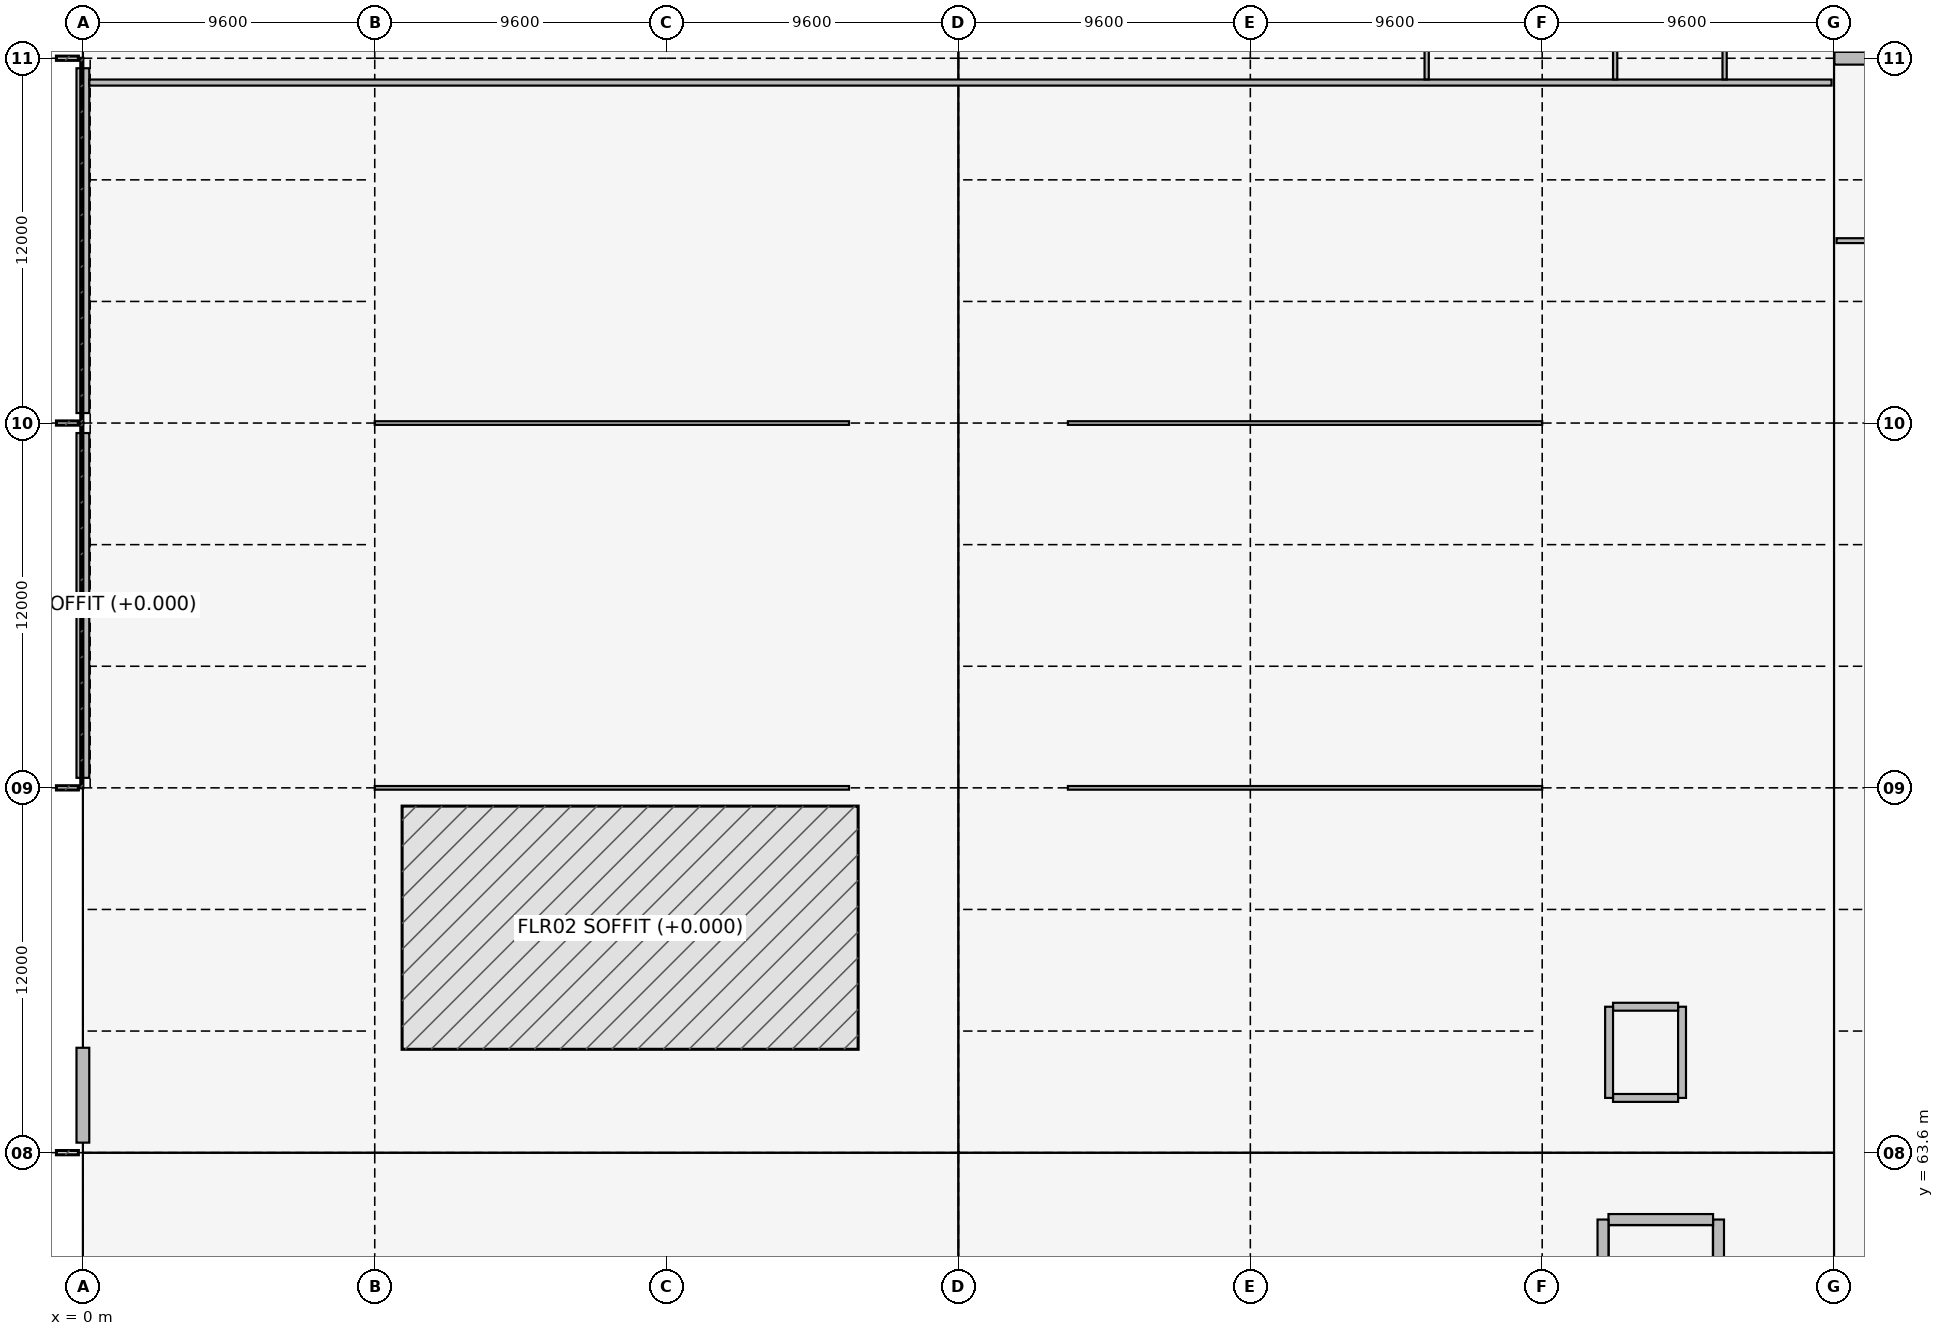
"""IFC4 building model, lengths in metres.
Left out: names, types, materials, properties, quantities, classifications, styles, units other than length and angle.
Written with IfcOpenShell. Run it as: python <this file> out.ifc"""

import sys

from ifc_helpers import new_model, si_unit, direction, frame, frame_2d, origin, origin_2d, place, context, subcontext, project, spatial, rectangle, i_section, extrude, element, fill, save


model = new_model("IFC4")
c1 = context("Model", 3, precision=1e-05, world=origin(), true_north=direction((0.0, 1.0)))
c2 = subcontext(c1, "Body", "Model", "MODEL_VIEW")
j1 = project(units=[si_unit("LENGTHUNIT", "METRE"), si_unit("PLANEANGLEUNIT", "RADIAN")], contexts=[c1])
p1 = place(None, origin())
s1 = spatial("IfcSite", under=j1, at=p1, CompositionType="ELEMENT")
p2 = place(p1, origin())
s2 = spatial("IfcBuilding", under=s1, at=p2, CompositionType="ELEMENT")
p3 = place(p2, origin())
s3 = spatial("IfcBuildingStorey", under=s2, at=p3, CompositionType="ELEMENT", Elevation=0.0)
for number, where, z_axis, x_axis in (
    (1, (0.0, 63.6, 0.0), (0.0, 0.0, 1.0), (1.0, 0.0, 0.0)),
    (2, (0.0, 75.6, 0.0), (0.0, 0.0, 1.0), (1.0, 0.0, 0.0)),
    (3, (0.0, 87.6, 0.0), (0.0, 0.0, 1.0), (1.0, 0.0, 0.0)),
    (4, (0.0, 99.6, 0.0), (0.0, 0.0, 1.0), (1.0, 0.0, 0.0)),
):
    element("IfcColumn", number, at=place(p3, frame(where, z_axis=z_axis, x_axis=x_axis)), inside=s3, PredefinedType="COLUMN", context=c2, shape_type="SweptSolid", body=[
        extrude(i_section(OverallWidth=0.3, OverallDepth=0.65, WebThickness=0.016, FlangeThickness=0.031, FilletRadius=0.027, at=origin_2d()), origin(), (0.0, 0.0, 1.0), 5.4),
    ])
for number, where, z_axis, x_axis in (
    (5, (9.6, 63.6, 0.0), (0.0, 0.0, 1.0), (1.0, 0.0, 0.0)),
    (6, (9.6, 75.6, 0.0), (0.0, 0.0, 1.0), (1.0, 0.0, 0.0)),
):
    element("IfcColumn", number, at=place(p3, frame(where, z_axis=z_axis, x_axis=x_axis)), inside=s3, PredefinedType="COLUMN", context=c2, shape_type="SweptSolid", body=[
        extrude(i_section(OverallWidth=0.3, OverallDepth=0.44, WebThickness=0.011, FlangeThickness=0.021, FilletRadius=0.027, at=origin_2d()), origin(), (0.0, 0.0, 1.0), 5.4),
    ])
for number, where, z_axis, x_axis in (
    (7, (9.6, 87.6, 0.0), (0.0, 0.0, 1.0), (1.0, 0.0, 0.0)),
    (8, (9.6, 99.6, 0.0), (0.0, 0.0, 1.0), (1.0, 0.0, 0.0)),
    (9, (19.2, 99.6, 0.0), (0.0, 0.0, 1.0), (1.0, 0.0, 0.0)),
    (10, (28.8, 99.6, 0.0), (0.0, 0.0, 1.0), (1.0, 0.0, 0.0)),
    (11, (38.4, 99.6, 0.0), (0.0, 0.0, 1.0), (1.0, 0.0, 0.0)),
):
    element("IfcColumn", number, at=place(p3, frame(where, z_axis=z_axis, x_axis=x_axis)), inside=s3, PredefinedType="COLUMN", context=c2, shape_type="SweptSolid", body=[
        extrude(i_section(OverallWidth=0.3, OverallDepth=0.54, WebThickness=0.012, FlangeThickness=0.024, FilletRadius=0.027, at=origin_2d()), origin(), (0.0, 0.0, 1.0), 5.4),
    ])
for number, where, z_axis, x_axis in (
    (12, (48.0, 63.6, 0.0), (0.0, 0.0, 1.0), (1.0, 0.0, 0.0)),
    (13, (48.0, 75.6, 0.0), (0.0, 0.0, 1.0), (1.0, 0.0, 0.0)),
):
    element("IfcColumn", number, at=place(p3, frame(where, z_axis=z_axis, x_axis=x_axis)), inside=s3, PredefinedType="COLUMN", context=c2, shape_type="SweptSolid", body=[
        extrude(i_section(OverallWidth=0.3, OverallDepth=0.44, WebThickness=0.011, FlangeThickness=0.021, FilletRadius=0.027, at=origin_2d()), origin(), (0.0, 0.0, 1.0), 5.4),
    ])
for number, where, z_axis, x_axis in (
    (14, (48.0, 87.6, 0.0), (0.0, 0.0, 1.0), (1.0, 0.0, 0.0)),
    (15, (48.0, 99.6, 0.0), (0.0, 0.0, 1.0), (1.0, 0.0, 0.0)),
):
    element("IfcColumn", number, at=place(p3, frame(where, z_axis=z_axis, x_axis=x_axis)), inside=s3, PredefinedType="COLUMN", context=c2, shape_type="SweptSolid", body=[
        extrude(i_section(OverallWidth=0.3, OverallDepth=0.54, WebThickness=0.012, FlangeThickness=0.024, FilletRadius=0.027, at=origin_2d()), origin(), (0.0, 0.0, 1.0), 5.4),
    ])
for number, where, z_axis, x_axis in (
    (16, (57.6, 63.6, 0.0), (0.0, 0.0, 1.0), (1.0, 0.0, 0.0)),
    (17, (57.6, 75.6, 0.0), (0.0, 0.0, 1.0), (1.0, 0.0, 0.0)),
    (18, (57.6, 87.6, 0.0), (0.0, 0.0, 1.0), (1.0, 0.0, 0.0)),
    (19, (57.6, 99.6, 0.0), (0.0, 0.0, 1.0), (1.0, 0.0, 0.0)),
):
    element("IfcColumn", number, at=place(p3, frame(where, z_axis=z_axis, x_axis=x_axis)), inside=s3, PredefinedType="COLUMN", context=c2, shape_type="SweptSolid", body=[
        extrude(i_section(OverallWidth=0.3, OverallDepth=0.65, WebThickness=0.016, FlangeThickness=0.031, FilletRadius=0.027, at=origin_2d()), origin(), (0.0, 0.0, 1.0), 5.4),
    ])
p4 = place(p3, frame((53.8, 53.4, 0.0), z_axis=(0.0, 0.0, 1.0), x_axis=(0.0, 1.0, 0.0)))
e20 = element("IfcWall", 20, at=p4, inside=s3, PredefinedType="SHEAR", context=c2, shape_type="SweptSolid", body=[
    extrude(rectangle(XDim=8.0, YDim=0.36, at=frame_2d((4.0, 0.0))), origin(), (0.0, 0.0, 1.0), 5.12),
])
p5 = place(p3, frame((53.62, 61.4, 0.0), z_axis=(0.0, 0.0, 1.0), x_axis=(-1.0, 0.0, 0.0)))
e21 = element("IfcWall", 21, at=p5, inside=s3, PredefinedType="SHEAR", context=c2, shape_type="SweptSolid", body=[
    extrude(rectangle(XDim=3.44, YDim=0.36, at=frame_2d((1.72, 0.0))), origin(), (0.0, 0.0, 1.0), 5.12),
])
p6 = place(p3, frame((50.0, 61.4, 0.0), z_axis=(0.0, 0.0, 1.0), x_axis=(0.0, -1.0, 0.0)))
e22 = element("IfcWall", 22, at=p6, inside=s3, PredefinedType="SHEAR", context=c2, shape_type="SweptSolid", body=[
    extrude(rectangle(XDim=8.0, YDim=0.36, at=frame_2d((4.0, 0.0))), origin(), (0.0, 0.0, 1.0), 5.12),
])
p7 = place(p3, frame((50.33, 65.4, 0.0), z_axis=(0.0, 0.0, 1.0), x_axis=(1.0, 0.0, 0.0)))
e23 = element("IfcWall", 23, at=p7, inside=s3, PredefinedType="SHEAR", context=c2, shape_type="SweptSolid", body=[
    extrude(rectangle(XDim=2.14, YDim=0.26, at=frame_2d((1.07, 0.0))), origin(), (0.0, 0.0, 1.0), 5.12),
])
p8 = place(p3, frame((52.6, 65.4, 0.0), z_axis=(0.0, 0.0, 1.0), x_axis=(0.0, 1.0, 0.0)))
e24 = element("IfcWall", 24, at=p8, inside=s3, PredefinedType="SHEAR", context=c2, shape_type="SweptSolid", body=[
    extrude(rectangle(XDim=3.0, YDim=0.26, at=frame_2d((1.5, 0.0))), origin(), (0.0, 0.0, 1.0), 5.12),
])
p9 = place(p8, frame((0.95, 0.0, 0.0)))
e25 = element("IfcOpeningElement", 25, at=p9, cuts=e24, PredefinedType="OPENING", context=c2, shape_type="SweptSolid", body=[
    extrude(rectangle(XDim=1.1, YDim=2.1, at=frame_2d((0.55, 1.05))), frame((0.0, 0.14, 0.0), z_axis=(0.0, -1.0, 0.0), x_axis=(1.0, 0.0, 0.0)), (0.0, 0.0, 1.0), 0.28),
])
p10 = place(p3, frame((52.47, 68.4, 0.0), z_axis=(0.0, 0.0, 1.0), x_axis=(-1.0, 0.0, 0.0)))
e26 = element("IfcWall", 26, at=p10, inside=s3, PredefinedType="SHEAR", context=c2, shape_type="SweptSolid", body=[
    extrude(rectangle(XDim=2.14, YDim=0.26, at=frame_2d((1.07, 0.0))), origin(), (0.0, 0.0, 1.0), 5.12),
])
p11 = place(p3, frame((50.2, 68.4, 0.0), z_axis=(0.0, 0.0, 1.0), x_axis=(0.0, -1.0, 0.0)))
e27 = element("IfcWall", 27, at=p11, inside=s3, PredefinedType="SHEAR", context=c2, shape_type="SweptSolid", body=[
    extrude(rectangle(XDim=3.0, YDim=0.26, at=frame_2d((1.5, 0.0))), origin(), (0.0, 0.0, 1.0), 5.12),
])
p12 = place(p3, frame((0.0, 63.929, 0.0), z_axis=(0.0, 0.0, 1.0), x_axis=(0.0, 1.0, 0.0)))
e28 = element("IfcWall", 28, at=p12, inside=s3, PredefinedType="STANDARD", context=c2, shape_type="SweptSolid", body=[
    extrude(rectangle(XDim=3.121, YDim=0.42, at=frame_2d((1.561, 0.0))), origin(), (0.0, 0.0, 1.0), 4.7),
])
p13 = place(p12, frame((0.48, 0.0, 0.0)))
e29 = element("IfcOpeningElement", 29, at=p13, cuts=e28, PredefinedType="OPENING", context=c2, shape_type="SweptSolid", body=[
    extrude(rectangle(XDim=2.0, YDim=2.3, at=frame_2d((1.0, 1.15))), frame((0.0, 0.22, 0.0), z_axis=(0.0, -1.0, 0.0), x_axis=(1.0, 0.0, 0.0)), (0.0, 0.0, 1.0), 0.44),
])
for number, where, z_axis, x_axis in (
    (30, (0.0, 75.929, 0.0), (0.0, 0.0, 1.0), (0.0, 1.0, 0.0)),
    (31, (0.0, 87.929, 0.0), (0.0, 0.0, 1.0), (0.0, 1.0, 0.0)),
):
    element("IfcWall", number, at=place(p3, frame(where, z_axis=z_axis, x_axis=x_axis)), inside=s3, PredefinedType="STANDARD", context=c2, shape_type="SweptSolid", body=[
        extrude(rectangle(XDim=11.342, YDim=0.42, at=frame_2d((5.671, 0.0))), origin(), (0.0, 0.0, 1.0), 4.7),
    ])
p14 = place(p3, frame((57.612, 99.6, 0.0), z_axis=(0.0, 0.0, 1.0), x_axis=(1.0, 0.0, 0.0)))
e32 = element("IfcWall", 32, at=p14, inside=s3, PredefinedType="STANDARD", context=c2, shape_type="SweptSolid", body=[
    extrude(rectangle(XDim=3.588, YDim=0.42, at=frame_2d((1.794, 0.0))), origin(), (0.0, 0.0, 1.0), 4.665),
])
p15 = place(p14, frame((0.45, 0.0, 0.0)))
e33 = element("IfcOpeningElement", 33, at=p15, cuts=e32, PredefinedType="OPENING", context=c2, shape_type="SweptSolid", body=[
    extrude(rectangle(XDim=2.2, YDim=2.4, at=frame_2d((1.1, 1.2))), frame((0.0, 0.22, 0.0), z_axis=(0.0, -1.0, 0.0), x_axis=(1.0, 0.0, 0.0)), (0.0, 0.0, 1.0), 0.44),
])
for number, where, z_axis, x_axis in (
    (34, (9.6, 75.6, 0.0), (0.0, 0.0, 1.0), (1.0, 0.0, 0.0)),
    (35, (9.6, 87.6, 0.0), (0.0, 0.0, 1.0), (1.0, 0.0, 0.0)),
):
    element("IfcWall", number, at=place(p3, frame(where, z_axis=z_axis, x_axis=x_axis)), inside=s3, PredefinedType="PARTITIONING", context=c2, shape_type="SweptSolid", body=[
        extrude(rectangle(XDim=15.6, YDim=0.12, at=frame_2d((7.8, 0.0))), origin(), (0.0, 0.0, 1.0), 2.4),
    ])
for number, where, z_axis, x_axis in (
    (36, (32.4, 75.6, 0.0), (0.0, 0.0, 1.0), (1.0, 0.0, 0.0)),
    (37, (32.4, 87.6, 0.0), (0.0, 0.0, 1.0), (1.0, 0.0, 0.0)),
):
    element("IfcWall", number, at=place(p3, frame(where, z_axis=z_axis, x_axis=x_axis)), inside=s3, PredefinedType="PARTITIONING", context=c2, shape_type="SweptSolid", body=[
        extrude(rectangle(XDim=15.6, YDim=0.12, at=frame_2d((7.8, 0.0))), origin(), (0.0, 0.0, 1.0), 2.4),
    ])
p16 = place(p3, frame((0.212, 98.8, 0.0), z_axis=(0.0, 0.0, 1.0), x_axis=(1.0, 0.0, 0.0)))
e38 = element("IfcWall", 38, at=p16, inside=s3, PredefinedType="PARTITIONING", context=c2, shape_type="SweptSolid", body=[
    extrude(rectangle(XDim=57.306, YDim=0.2, at=frame_2d((28.653, 0.0))), origin(), (0.0, 0.0, 1.0), 5.04),
])
p17 = place(p16, frame((13.5, 0.0, 0.0)))
e39 = element("IfcOpeningElement", 39, at=p17, cuts=e38, PredefinedType="OPENING", context=c2, shape_type="SweptSolid", body=[
    extrude(rectangle(XDim=1.6, YDim=2.2, at=frame_2d((0.8, 1.1))), frame((0.0, 0.11, 0.0), z_axis=(0.0, -1.0, 0.0), x_axis=(1.0, 0.0, 0.0)), (0.0, 0.0, 1.0), 0.22),
])
p18 = place(p16, frame((33.333, 0.0, 0.0)))
e40 = element("IfcOpeningElement", 40, at=p18, cuts=e38, PredefinedType="OPENING", context=c2, shape_type="SweptSolid", body=[
    extrude(rectangle(XDim=1.6, YDim=2.2, at=frame_2d((0.8, 1.1))), frame((0.0, 0.11, 0.0), z_axis=(0.0, -1.0, 0.0), x_axis=(1.0, 0.0, 0.0)), (0.0, 0.0, 1.0), 0.22),
])
p19 = place(p16, frame((44.267, 0.0, 0.0)))
e41 = element("IfcOpeningElement", 41, at=p19, cuts=e38, PredefinedType="OPENING", context=c2, shape_type="SweptSolid", body=[
    extrude(rectangle(XDim=1.02, YDim=2.12, at=frame_2d((0.51, 1.06))), frame((0.0, 0.11, 0.0), z_axis=(0.0, -1.0, 0.0), x_axis=(1.0, 0.0, 0.0)), (0.0, 0.0, 1.0), 0.22),
])
p20 = place(p16, frame((51.067, 0.0, 0.0)))
e42 = element("IfcOpeningElement", 42, at=p20, cuts=e38, PredefinedType="OPENING", context=c2, shape_type="SweptSolid", body=[
    extrude(rectangle(XDim=0.95, YDim=2.1, at=frame_2d((0.475, 1.05))), frame((0.0, 0.11, 0.0), z_axis=(0.0, -1.0, 0.0), x_axis=(1.0, 0.0, 0.0)), (0.0, 0.0, 1.0), 0.22),
])
p21 = place(p16, frame((54.0, 0.0, 0.0)))
e43 = element("IfcOpeningElement", 43, at=p21, cuts=e38, PredefinedType="OPENING", context=c2, shape_type="SweptSolid", body=[
    extrude(rectangle(XDim=1.0, YDim=2.1, at=frame_2d((0.5, 1.05))), frame((0.0, 0.11, 0.0), z_axis=(0.0, -1.0, 0.0), x_axis=(1.0, 0.0, 0.0)), (0.0, 0.0, 1.0), 0.22),
])
p22 = place(p3, frame((44.2, 98.902, 0.0), z_axis=(0.0, 0.0, 1.0), x_axis=(0.0, 1.0, 0.0)))
e44 = element("IfcWall", 44, at=p22, inside=s3, PredefinedType="PARTITIONING", context=c2, shape_type="SweptSolid", body=[
    extrude(rectangle(XDim=12.616, YDim=0.14, at=frame_2d((6.308, 0.0))), origin(), (0.0, 0.0, 1.0), 5.04),
])
p23 = place(p22, frame((8.0, 0.0, 0.0)))
e45 = element("IfcOpeningElement", 45, at=p23, cuts=e44, PredefinedType="OPENING", context=c2, shape_type="SweptSolid", body=[
    extrude(rectangle(XDim=1.05, YDim=2.15, at=frame_2d((0.525, 1.075))), frame((0.0, 0.08, 0.0), z_axis=(0.0, -1.0, 0.0), x_axis=(1.0, 0.0, 0.0)), (0.0, 0.0, 1.0), 0.16),
])
for number, where, z_axis, x_axis in (
    (46, (50.4, 98.902, 0.0), (0.0, 0.0, 1.0), (0.0, 1.0, 0.0)),
    (47, (54.0, 98.902, 0.0), (0.0, 0.0, 1.0), (0.0, 1.0, 0.0)),
):
    element("IfcWall", number, at=place(p3, frame(where, z_axis=z_axis, x_axis=x_axis)), inside=s3, PredefinedType="PARTITIONING", context=c2, shape_type="SweptSolid", body=[
        extrude(rectangle(XDim=6.626, YDim=0.14, at=frame_2d((3.313, 0.0))), origin(), (0.0, 0.0, 1.0), 5.04),
    ])
p24 = place(p3, frame((57.682, 93.6, 0.0), z_axis=(0.0, 0.0, 1.0), x_axis=(1.0, 0.0, 0.0)))
e48 = element("IfcWall", 48, at=p24, inside=s3, PredefinedType="PARTITIONING", context=c2, shape_type="SweptSolid", body=[
    extrude(rectangle(XDim=10.936, YDim=0.16, at=frame_2d((5.468, 0.0))), origin(), (0.0, 0.0, 1.0), 5.04),
])
p25 = place(p24, frame((3.5, 0.0, 0.0)))
e49 = element("IfcOpeningElement", 49, at=p25, cuts=e48, PredefinedType="OPENING", context=c2, shape_type="SweptSolid", body=[
    extrude(rectangle(XDim=1.7, YDim=2.2, at=frame_2d((0.85, 1.1))), frame((0.0, 0.09, 0.0), z_axis=(0.0, -1.0, 0.0), x_axis=(1.0, 0.0, 0.0)), (0.0, 0.0, 1.0), 0.18),
])
p26 = place(p13, origin())
e50 = element("IfcDoor", 50, at=p26, inside=s3, OperationType="DOUBLE_DOOR_SINGLE_SWING", PredefinedType="DOOR", context=c2, shape_type="SweptSolid", body=[
    extrude(rectangle(XDim=2.0, YDim=2.3, at=frame_2d((1.0, 1.15))), frame((0.0, 0.025, 0.0), z_axis=(0.0, -1.0, 0.0), x_axis=(1.0, 0.0, 0.0)), (0.0, 0.0, 1.0), 0.05),
])
fill(e29, e50)
p27 = place(p15, origin())
e51 = element("IfcDoor", 51, at=p27, inside=s3, OperationType="DOUBLE_DOOR_SINGLE_SWING", PredefinedType="DOOR", context=c2, shape_type="SweptSolid", body=[
    extrude(rectangle(XDim=2.2, YDim=2.4, at=frame_2d((1.1, 1.2))), frame((0.0, 0.025, 0.0), z_axis=(0.0, -1.0, 0.0), x_axis=(1.0, 0.0, 0.0)), (0.0, 0.0, 1.0), 0.05),
])
fill(e33, e51)
p28 = place(p17, origin())
e52 = element("IfcDoor", 52, at=p28, inside=s3, OperationType="SINGLE_SWING_RIGHT", PredefinedType="DOOR", context=c2, shape_type="SweptSolid", body=[
    extrude(rectangle(XDim=1.6, YDim=2.2, at=frame_2d((0.8, 1.1))), frame((0.0, 0.025, 0.0), z_axis=(0.0, -1.0, 0.0), x_axis=(1.0, 0.0, 0.0)), (0.0, 0.0, 1.0), 0.05),
])
fill(e39, e52)
p29 = place(p18, origin())
e53 = element("IfcDoor", 53, at=p29, inside=s3, OperationType="SINGLE_SWING_LEFT", PredefinedType="DOOR", context=c2, shape_type="SweptSolid", body=[
    extrude(rectangle(XDim=1.6, YDim=2.2, at=frame_2d((0.8, 1.1))), frame((0.0, 0.025, 0.0), z_axis=(0.0, -1.0, 0.0), x_axis=(1.0, 0.0, 0.0)), (0.0, 0.0, 1.0), 0.05),
])
fill(e40, e53)
p30 = place(p19, origin())
e54 = element("IfcDoor", 54, at=p30, inside=s3, OperationType="SINGLE_SWING_RIGHT", PredefinedType="DOOR", context=c2, shape_type="SweptSolid", body=[
    extrude(rectangle(XDim=1.02, YDim=2.12, at=frame_2d((0.51, 1.06))), frame((0.0, 0.025, 0.0), z_axis=(0.0, -1.0, 0.0), x_axis=(1.0, 0.0, 0.0)), (0.0, 0.0, 1.0), 0.05),
])
fill(e41, e54)
p31 = place(p20, origin())
e55 = element("IfcDoor", 55, at=p31, inside=s3, OperationType="SINGLE_SWING_LEFT", PredefinedType="DOOR", context=c2, shape_type="SweptSolid", body=[
    extrude(rectangle(XDim=0.95, YDim=2.1, at=frame_2d((0.475, 1.05))), frame((0.0, 0.025, 0.0), z_axis=(0.0, -1.0, 0.0), x_axis=(1.0, 0.0, 0.0)), (0.0, 0.0, 1.0), 0.05),
])
fill(e42, e55)
p32 = place(p21, origin())
e56 = element("IfcDoor", 56, at=p32, inside=s3, OperationType="SINGLE_SWING_RIGHT", PredefinedType="DOOR", context=c2, shape_type="SweptSolid", body=[
    extrude(rectangle(XDim=1.0, YDim=2.1, at=frame_2d((0.5, 1.05))), frame((0.0, 0.025, 0.0), z_axis=(0.0, -1.0, 0.0), x_axis=(1.0, 0.0, 0.0)), (0.0, 0.0, 1.0), 0.05),
])
fill(e43, e56)
p33 = place(p9, origin())
e57 = element("IfcDoor", 57, at=p33, inside=s3, OperationType="SLIDING_TO_LEFT", PredefinedType="DOOR", context=c2, shape_type="SweptSolid", body=[
    extrude(rectangle(XDim=1.1, YDim=2.1, at=frame_2d((0.55, 1.05))), frame((0.0, 0.025, 0.0), z_axis=(0.0, -1.0, 0.0), x_axis=(1.0, 0.0, 0.0)), (0.0, 0.0, 1.0), 0.05),
])
fill(e25, e57)
save(model, sys.argv[1])
